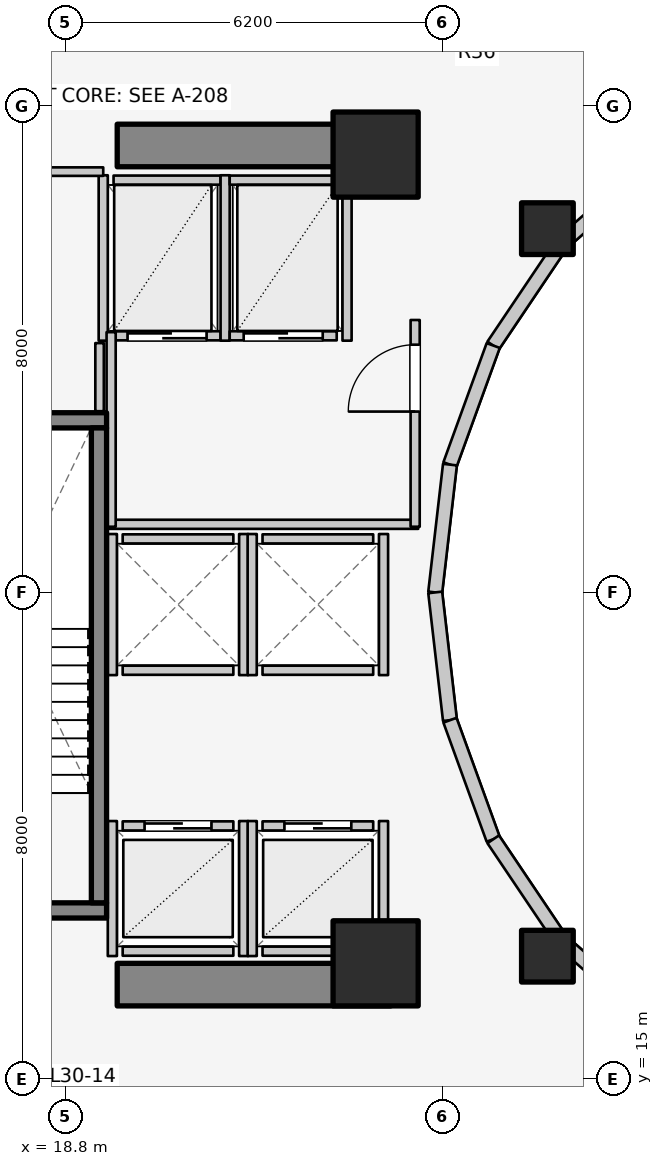
"""IFC4 building model, lengths in metres.
Left out: names, types, materials, properties, quantities, classifications, styles, units other than length and angle.
Written with IfcOpenShell. Run it as: python <this file> out.ifc"""

import sys

from ifc_helpers import new_model, si_unit, direction, frame, frame_2d, origin, origin_2d, place, context, subcontext, project, spatial, rectangle, extrude, element, fill, save


model = new_model("IFC4")
c1 = context("Model", 3, precision=1e-05, world=origin(), true_north=direction((0.0, 1.0)))
c2 = subcontext(c1, "Body", "Model", "MODEL_VIEW")
j1 = project(units=[si_unit("LENGTHUNIT", "METRE"), si_unit("PLANEANGLEUNIT", "RADIAN")], contexts=[c1])
p1 = place(None, origin())
s1 = spatial("IfcSite", under=j1, at=p1, CompositionType="ELEMENT")
p2 = place(p1, origin())
s2 = spatial("IfcBuilding", under=s1, at=p2, CompositionType="ELEMENT")
p3 = place(p2, frame((0.0, 0.0, 101.1)))
s3 = spatial("IfcBuildingStorey", under=s2, at=p3, CompositionType="ELEMENT", Elevation=101.1)
for number, where, z_axis, x_axis in (
    (1, (19.65, 16.55, 0.0), (0.0, 0.0, 1.0), (1.0, 0.0, 0.0)),
    (2, (19.65, 30.35, 0.0), (0.0, 0.0, 1.0), (1.0, 0.0, 0.0)),
):
    element("IfcWall", number, at=place(p3, frame(where, z_axis=z_axis, x_axis=x_axis)), inside=s3, PredefinedType="SHEAR", context=c2, shape_type="SweptSolid", body=[
        extrude(rectangle(XDim=4.5, YDim=0.7, at=frame_2d((2.25, 0.0))), origin(), (0.0, 0.0, 1.0), 3.1),
    ])
p4 = place(p3, frame((16.105, 17.77, 0.0), z_axis=(0.0, 0.0, 1.0), x_axis=(1.0, 0.0, 0.0)))
e3 = element("IfcWall", 3, at=p4, inside=s3, PredefinedType="SOLIDWALL", context=c2, shape_type="SweptSolid", body=[
    extrude(rectangle(XDim=3.37, YDim=0.25, at=frame_2d((1.685, 0.0))), origin(), (0.0, 0.0, 1.0), 3.1),
])
p5 = place(p4, frame((1.135, 0.0, 0.0)))
e4 = element("IfcOpeningElement", 4, at=p5, cuts=e3, PredefinedType="OPENING", context=c2, shape_type="SweptSolid", body=[
    extrude(rectangle(XDim=1.1, YDim=2.1, at=frame_2d((0.55, 1.05))), frame((0.0, 0.135, 0.0), z_axis=(0.0, -1.0, 0.0), x_axis=(1.0, 0.0, 0.0)), (0.0, 0.0, 1.0), 0.27),
])
p6 = place(p3, frame((16.105, 25.83, 0.0), z_axis=(0.0, 0.0, 1.0), x_axis=(1.0, 0.0, 0.0)))
e5 = element("IfcWall", 5, at=p6, inside=s3, PredefinedType="SOLIDWALL", context=c2, shape_type="SweptSolid", body=[
    extrude(rectangle(XDim=3.37, YDim=0.25, at=frame_2d((1.685, 0.0))), origin(), (0.0, 0.0, 1.0), 3.1),
])
p7 = place(p3, frame((19.35, 17.895, 0.0), z_axis=(0.0, 0.0, 1.0), x_axis=(0.0, 1.0, 0.0)))
e6 = element("IfcWall", 6, at=p7, inside=s3, PredefinedType="SOLIDWALL", context=c2, shape_type="SweptSolid", body=[
    extrude(rectangle(XDim=7.81, YDim=0.25, at=frame_2d((3.905, 0.0))), origin(), (0.0, 0.0, 1.0), 3.1),
])
for number, where, z_axis, x_axis in (
    (7, (23.9, 16.9, 0.0), (0.0, 0.0, 1.0), (1.0, 0.0, 0.0)),
    (8, (23.9, 30.2, 0.0), (0.0, 0.0, 1.0), (1.0, 0.0, 0.0)),
):
    element("IfcColumn", number, at=place(p3, frame(where, z_axis=z_axis, x_axis=x_axis)), inside=s3, PredefinedType="COLUMN", context=c2, shape_type="SweptSolid", body=[
        extrude(rectangle(XDim=1.4, YDim=1.4, at=origin_2d()), origin(), (0.0, 0.0, 1.0), 3.1),
    ])
for number, where, z_axis, x_axis in (
    (9, (26.725, 28.982, 0.0), (0.0, 0.0, 1.0), (1.0, 0.0, 0.0)),
    (10, (26.725, 17.018, 0.0), (0.0, 0.0, 1.0), (1.0, 0.0, 0.0)),
):
    element("IfcColumn", number, at=place(p3, frame(where, z_axis=z_axis, x_axis=x_axis)), inside=s3, PredefinedType="COLUMN", context=c2, shape_type="SweptSolid", body=[
        extrude(rectangle(XDim=0.85, YDim=0.85, at=origin_2d()), origin(), (0.0, 0.0, 1.0), 3.1),
    ])
p8 = place(p3, frame((28.44, 30.032, 0.0), z_axis=(0.0, 0.0, 1.0), x_axis=(-0.752576694707, -0.658504607869, 0.0)))
e11 = element("IfcWall", 11, at=p8, inside=s3, PredefinedType="STANDARD", context=c2, shape_type="SweptSolid", body=[
    extrude(rectangle(XDim=1.959, YDim=0.23, at=frame_2d((0.98, 0.0))), origin(), (0.0, 0.0, 1.0), 1.22),
])
p9 = place(p3, frame((26.965, 28.742, 0.0), z_axis=(0.0, 0.0, 1.0), x_axis=(-0.558197800898, -0.829707909492, 0.0)))
e12 = element("IfcWall", 12, at=p9, inside=s3, PredefinedType="STANDARD", context=c2, shape_type="SweptSolid", body=[
    extrude(rectangle(XDim=2.027, YDim=0.23, at=frame_2d((1.013, 0.0))), origin(), (0.0, 0.0, 1.0), 1.22),
])
p10 = place(p3, frame((25.834, 27.06, 0.0), z_axis=(0.0, 0.0, 1.0), x_axis=(-0.341423187295, -0.93990968033, 0.0)))
e13 = element("IfcWall", 13, at=p10, inside=s3, PredefinedType="STANDARD", context=c2, shape_type="SweptSolid", body=[
    extrude(rectangle(XDim=2.084, YDim=0.23, at=frame_2d((1.042, 0.0))), origin(), (0.0, 0.0, 1.0), 2.56),
])
for number, where, z_axis, x_axis in (
    (14, (25.123, 25.102, 0.0), (0.0, 0.0, 1.0), (-0.115, -0.993, 0.0)),
    (15, (24.88, 23.0, 0.0), (0.0, 0.0, 1.0), (0.115, -0.993, 0.0)),
):
    element("IfcWall", number, at=place(p3, frame(where, z_axis=z_axis, x_axis=x_axis)), inside=s3, PredefinedType="STANDARD", context=c2, shape_type="SweptSolid", body=[
        extrude(rectangle(XDim=2.115, YDim=0.23, at=frame_2d((1.058, 0.0))), origin(), (0.0, 0.0, 1.0), 2.56),
    ])
p11 = place(p3, frame((25.123, 20.898, 0.0), z_axis=(0.0, 0.0, 1.0), x_axis=(0.341423187295, -0.93990968033, 0.0)))
e16 = element("IfcWall", 16, at=p11, inside=s3, PredefinedType="STANDARD", context=c2, shape_type="SweptSolid", body=[
    extrude(rectangle(XDim=2.084, YDim=0.23, at=frame_2d((1.042, 0.0))), origin(), (0.0, 0.0, 1.0), 2.56),
])
p12 = place(p3, frame((25.834, 18.94, 0.0), z_axis=(0.0, 0.0, 1.0), x_axis=(0.558197800898, -0.829707909492, 0.0)))
e17 = element("IfcWall", 17, at=p12, inside=s3, PredefinedType="STANDARD", context=c2, shape_type="SweptSolid", body=[
    extrude(rectangle(XDim=2.027, YDim=0.23, at=frame_2d((1.013, 0.0))), origin(), (0.0, 0.0, 1.0), 1.22),
])
p13 = place(p3, frame((26.965, 17.258, 0.0), z_axis=(0.0, 0.0, 1.0), x_axis=(0.752576694707, -0.658504607869, 0.0)))
e18 = element("IfcWall", 18, at=p13, inside=s3, PredefinedType="STANDARD", context=c2, shape_type="SweptSolid", body=[
    extrude(rectangle(XDim=1.959, YDim=0.23, at=frame_2d((0.98, 0.0))), origin(), (0.0, 0.0, 1.0), 1.22),
])
p14 = place(p3, frame((19.74, 19.16, 0.0), z_axis=(0.0, 0.0, 1.0), x_axis=(1.0, 0.0, 0.0)))
e19 = element("IfcWall", 19, at=p14, inside=s3, PredefinedType="SOLIDWALL", context=c2, shape_type="SweptSolid", body=[
    extrude(rectangle(XDim=1.82, YDim=0.15, at=frame_2d((0.91, 0.0))), origin(), (0.0, 0.0, 1.0), 2.575),
])
p15 = place(p14, frame((0.36, 0.0, 0.0)))
e20 = element("IfcOpeningElement", 20, at=p15, cuts=e19, PredefinedType="OPENING", context=c2, shape_type="SweptSolid", body=[
    extrude(rectangle(XDim=1.1, YDim=2.1, at=frame_2d((0.55, 1.05))), frame((0.0, 0.085, 0.0), z_axis=(0.0, -1.0, 0.0), x_axis=(1.0, 0.0, 0.0)), (0.0, 0.0, 1.0), 0.17),
])
p16 = place(p3, frame((19.74, 17.1, 0.0), z_axis=(0.0, 0.0, 1.0), x_axis=(1.0, 0.0, 0.0)))
e21 = element("IfcWall", 21, at=p16, inside=s3, PredefinedType="SOLIDWALL", context=c2, shape_type="SweptSolid", body=[
    extrude(rectangle(XDim=1.82, YDim=0.15, at=frame_2d((0.91, 0.0))), origin(), (0.0, 0.0, 1.0), 2.575),
])
p17 = place(p3, frame((19.57, 17.02, 0.0), z_axis=(0.0, 0.0, 1.0), x_axis=(0.0, 1.0, 0.0)))
e22 = element("IfcWall", 22, at=p17, inside=s3, PredefinedType="SOLIDWALL", context=c2, shape_type="SweptSolid", body=[
    extrude(rectangle(XDim=2.22, YDim=0.15, at=frame_2d((1.11, 0.0))), origin(), (0.0, 0.0, 1.0), 2.12),
])
p18 = place(p3, frame((21.73, 17.02, 0.0), z_axis=(0.0, 0.0, 1.0), x_axis=(0.0, 1.0, 0.0)))
e23 = element("IfcWall", 23, at=p18, inside=s3, PredefinedType="SOLIDWALL", context=c2, shape_type="SweptSolid", body=[
    extrude(rectangle(XDim=2.22, YDim=0.15, at=frame_2d((1.11, 0.0))), origin(), (0.0, 0.0, 1.0), 2.575),
])
p19 = place(p3, frame((22.04, 19.16, 0.0), z_axis=(0.0, 0.0, 1.0), x_axis=(1.0, 0.0, 0.0)))
e24 = element("IfcWall", 24, at=p19, inside=s3, PredefinedType="SOLIDWALL", context=c2, shape_type="SweptSolid", body=[
    extrude(rectangle(XDim=1.82, YDim=0.15, at=frame_2d((0.91, 0.0))), origin(), (0.0, 0.0, 1.0), 2.12),
])
p20 = place(p19, frame((0.36, 0.0, 0.0)))
e25 = element("IfcOpeningElement", 25, at=p20, cuts=e24, PredefinedType="OPENING", context=c2, shape_type="SweptSolid", body=[
    extrude(rectangle(XDim=1.1, YDim=2.1, at=frame_2d((0.55, 1.05))), frame((0.0, 0.085, 0.0), z_axis=(0.0, -1.0, 0.0), x_axis=(1.0, 0.0, 0.0)), (0.0, 0.0, 1.0), 0.17),
])
p21 = place(p3, frame((22.04, 17.1, 0.0), z_axis=(0.0, 0.0, 1.0), x_axis=(1.0, 0.0, 0.0)))
e26 = element("IfcWall", 26, at=p21, inside=s3, PredefinedType="SOLIDWALL", context=c2, shape_type="SweptSolid", body=[
    extrude(rectangle(XDim=1.82, YDim=0.15, at=frame_2d((0.91, 0.0))), origin(), (0.0, 0.0, 1.0), 2.12),
])
p22 = place(p3, frame((21.87, 17.02, 0.0), z_axis=(0.0, 0.0, 1.0), x_axis=(0.0, 1.0, 0.0)))
e27 = element("IfcWall", 27, at=p22, inside=s3, PredefinedType="SOLIDWALL", context=c2, shape_type="SweptSolid", body=[
    extrude(rectangle(XDim=2.22, YDim=0.15, at=frame_2d((1.11, 0.0))), origin(), (0.0, 0.0, 1.0), 2.575),
])
p23 = place(p3, frame((24.03, 17.02, 0.0), z_axis=(0.0, 0.0, 1.0), x_axis=(0.0, 1.0, 0.0)))
e28 = element("IfcWall", 28, at=p23, inside=s3, PredefinedType="SOLIDWALL", context=c2, shape_type="SweptSolid", body=[
    extrude(rectangle(XDim=2.22, YDim=0.15, at=frame_2d((1.11, 0.0))), origin(), (0.0, 0.0, 1.0), 1.873),
])
for number, where, z_axis, x_axis in (
    (29, (19.74, 21.72, 0.0), (0.0, 0.0, 1.0), (1.0, 0.0, 0.0)),
    (30, (19.74, 23.88, 0.0), (0.0, 0.0, 1.0), (1.0, 0.0, 0.0)),
):
    element("IfcWall", number, at=place(p3, frame(where, z_axis=z_axis, x_axis=x_axis)), inside=s3, PredefinedType="SOLIDWALL", context=c2, shape_type="SweptSolid", body=[
        extrude(rectangle(XDim=1.82, YDim=0.15, at=frame_2d((0.91, 0.0))), origin(), (0.0, 0.0, 1.0), 2.575),
    ])
for number, where, z_axis, x_axis in (
    (31, (19.57, 21.64, 0.0), (0.0, 0.0, 1.0), (0.0, 1.0, 0.0)),
    (32, (21.73, 21.64, 0.0), (0.0, 0.0, 1.0), (0.0, 1.0, 0.0)),
):
    element("IfcWall", number, at=place(p3, frame(where, z_axis=z_axis, x_axis=x_axis)), inside=s3, PredefinedType="SOLIDWALL", context=c2, shape_type="SweptSolid", body=[
        extrude(rectangle(XDim=2.32, YDim=0.15, at=frame_2d((1.16, 0.0))), origin(), (0.0, 0.0, 1.0), 2.575),
    ])
for number, where, z_axis, x_axis in (
    (33, (22.04, 21.72, 0.0), (0.0, 0.0, 1.0), (1.0, 0.0, 0.0)),
    (34, (22.04, 23.88, 0.0), (0.0, 0.0, 1.0), (1.0, 0.0, 0.0)),
):
    element("IfcWall", number, at=place(p3, frame(where, z_axis=z_axis, x_axis=x_axis)), inside=s3, PredefinedType="SOLIDWALL", context=c2, shape_type="SweptSolid", body=[
        extrude(rectangle(XDim=1.82, YDim=0.15, at=frame_2d((0.91, 0.0))), origin(), (0.0, 0.0, 1.0), 2.12),
    ])
p24 = place(p3, frame((21.87, 21.64, 0.0), z_axis=(0.0, 0.0, 1.0), x_axis=(0.0, 1.0, 0.0)))
e35 = element("IfcWall", 35, at=p24, inside=s3, PredefinedType="SOLIDWALL", context=c2, shape_type="SweptSolid", body=[
    extrude(rectangle(XDim=2.32, YDim=0.15, at=frame_2d((1.16, 0.0))), origin(), (0.0, 0.0, 1.0), 2.575),
])
p25 = place(p3, frame((24.03, 21.64, 0.0), z_axis=(0.0, 0.0, 1.0), x_axis=(0.0, 1.0, 0.0)))
e36 = element("IfcWall", 36, at=p25, inside=s3, PredefinedType="SOLIDWALL", context=c2, shape_type="SweptSolid", body=[
    extrude(rectangle(XDim=2.32, YDim=0.15, at=frame_2d((1.16, 0.0))), origin(), (0.0, 0.0, 1.0), 2.12),
])
p26 = place(p3, frame((19.59, 27.22, 0.0), z_axis=(0.0, 0.0, 1.0), x_axis=(1.0, 0.0, 0.0)))
e37 = element("IfcWall", 37, at=p26, inside=s3, PredefinedType="SOLIDWALL", context=c2, shape_type="SweptSolid", body=[
    extrude(rectangle(XDim=1.76, YDim=0.15, at=frame_2d((0.88, 0.0))), origin(), (0.0, 0.0, 1.0), 2.575),
])
p27 = place(p26, frame((0.23, 0.0, 0.0)))
e38 = element("IfcOpeningElement", 38, at=p27, cuts=e37, PredefinedType="OPENING", context=c2, shape_type="SweptSolid", body=[
    extrude(rectangle(XDim=1.3, YDim=2.1, at=frame_2d((0.65, 1.05))), frame((0.0, 0.085, 0.0), z_axis=(0.0, -1.0, 0.0), x_axis=(1.0, 0.0, 0.0)), (0.0, 0.0, 1.0), 0.17),
])
p28 = place(p3, frame((19.59, 29.78, 0.0), z_axis=(0.0, 0.0, 1.0), x_axis=(1.0, 0.0, 0.0)))
e39 = element("IfcWall", 39, at=p28, inside=s3, PredefinedType="SOLIDWALL", context=c2, shape_type="SweptSolid", body=[
    extrude(rectangle(XDim=1.76, YDim=0.15, at=frame_2d((0.88, 0.0))), origin(), (0.0, 0.0, 1.0), 2.575),
])
for number, where, z_axis, x_axis in (
    (40, (19.42, 27.14, 0.0), (0.0, 0.0, 1.0), (0.0, 1.0, 0.0)),
    (41, (21.425, 27.14, 0.0), (0.0, 0.0, 1.0), (0.0, 1.0, 0.0)),
):
    element("IfcWall", number, at=place(p3, frame(where, z_axis=z_axis, x_axis=x_axis)), inside=s3, PredefinedType="SOLIDWALL", context=c2, shape_type="SweptSolid", body=[
        extrude(rectangle(XDim=2.72, YDim=0.15, at=frame_2d((1.36, 0.0))), origin(), (0.0, 0.0, 1.0), 2.575),
    ])
p29 = place(p3, frame((21.5, 27.22, 0.0), z_axis=(0.0, 0.0, 1.0), x_axis=(1.0, 0.0, 0.0)))
e42 = element("IfcWall", 42, at=p29, inside=s3, PredefinedType="SOLIDWALL", context=c2, shape_type="SweptSolid", body=[
    extrude(rectangle(XDim=1.76, YDim=0.15, at=frame_2d((0.88, 0.0))), origin(), (0.0, 0.0, 1.0), 2.575),
])
p30 = place(p29, frame((0.23, 0.0, 0.0)))
e43 = element("IfcOpeningElement", 43, at=p30, cuts=e42, PredefinedType="OPENING", context=c2, shape_type="SweptSolid", body=[
    extrude(rectangle(XDim=1.3, YDim=2.1, at=frame_2d((0.65, 1.05))), frame((0.0, 0.085, 0.0), z_axis=(0.0, -1.0, 0.0), x_axis=(1.0, 0.0, 0.0)), (0.0, 0.0, 1.0), 0.17),
])
p31 = place(p3, frame((21.5, 29.78, 0.0), z_axis=(0.0, 0.0, 1.0), x_axis=(1.0, 0.0, 0.0)))
e44 = element("IfcWall", 44, at=p31, inside=s3, PredefinedType="SOLIDWALL", context=c2, shape_type="SweptSolid", body=[
    extrude(rectangle(XDim=1.76, YDim=0.15, at=frame_2d((0.88, 0.0))), origin(), (0.0, 0.0, 1.0), 2.575),
])
p32 = place(p3, frame((23.43, 27.14, 0.0), z_axis=(0.0, 0.0, 1.0), x_axis=(0.0, 1.0, 0.0)))
e45 = element("IfcWall", 45, at=p32, inside=s3, PredefinedType="SOLIDWALL", context=c2, shape_type="SweptSolid", body=[
    extrude(rectangle(XDim=2.72, YDim=0.15, at=frame_2d((1.36, 0.0))), origin(), (0.0, 0.0, 1.0), 2.575),
])
p33 = place(p3, frame((19.52, 24.12, 0.0), z_axis=(0.0, 0.0, 1.0), x_axis=(1.0, 0.0, 0.0)))
e46 = element("IfcWall", 46, at=p33, inside=s3, PredefinedType="PARTITIONING", context=c2, shape_type="SweptSolid", body=[
    extrude(rectangle(XDim=5.08, YDim=0.15, at=frame_2d((2.54, 0.0))), origin(), (0.0, 0.0, 1.0), 2.12),
])
p34 = place(p3, frame((19.55, 24.08, 0.0), z_axis=(0.0, 0.0, 1.0), x_axis=(0.0, 1.0, 0.0)))
e47 = element("IfcWall", 47, at=p34, inside=s3, PredefinedType="PARTITIONING", context=c2, shape_type="SweptSolid", body=[
    extrude(rectangle(XDim=3.2, YDim=0.15, at=frame_2d((1.6, 0.0))), origin(), (0.0, 0.0, 1.0), 2.575),
])
p35 = place(p3, frame((24.55, 24.08, 0.0), z_axis=(0.0, 0.0, 1.0), x_axis=(0.0, 1.0, 0.0)))
e48 = element("IfcWall", 48, at=p35, inside=s3, PredefinedType="PARTITIONING", context=c2, shape_type="SweptSolid", body=[
    extrude(rectangle(XDim=3.4, YDim=0.15, at=frame_2d((1.7, 0.0))), origin(), (0.0, 0.0, 1.0), 2.575),
])
p36 = place(p35, frame((1.894, 0.0, 0.0)))
e49 = element("IfcOpeningElement", 49, at=p36, cuts=e48, PredefinedType="OPENING", context=c2, shape_type="SweptSolid", body=[
    extrude(rectangle(XDim=1.1, YDim=2.1, at=frame_2d((0.55, 1.05))), frame((0.0, 0.085, 0.0), z_axis=(0.0, -1.0, 0.0), x_axis=(1.0, 0.0, 0.0)), (0.0, 0.0, 1.0), 0.17),
])
p37 = place(p3, frame((16.12, 29.92, 0.0), z_axis=(0.0, 0.0, 1.0), x_axis=(1.0, 0.0, 0.0)))
e50 = element("IfcWall", 50, at=p37, inside=s3, PredefinedType="PLUMBINGWALL", context=c2, shape_type="SweptSolid", body=[
    extrude(rectangle(XDim=3.3, YDim=0.14, at=frame_2d((1.65, 0.0))), origin(), (0.0, 0.0, 1.0), 2.575),
])
p38 = place(p37, frame((1.516, 0.0, 0.0)))
e51 = element("IfcOpeningElement", 51, at=p38, cuts=e50, PredefinedType="OPENING", context=c2, shape_type="SweptSolid", body=[
    extrude(rectangle(XDim=0.85, YDim=2.05, at=frame_2d((0.425, 1.025))), frame((0.0, 0.08, 0.0), z_axis=(0.0, -1.0, 0.0), x_axis=(1.0, 0.0, 0.0)), (0.0, 0.0, 1.0), 0.16),
])
p39 = place(p3, frame((19.36, 25.98, 0.0), z_axis=(0.0, 0.0, 1.0), x_axis=(0.0, 1.0, 0.0)))
e52 = element("IfcWall", 52, at=p39, inside=s3, PredefinedType="PLUMBINGWALL", context=c2, shape_type="SweptSolid", body=[
    extrude(rectangle(XDim=1.12, YDim=0.14, at=frame_2d((0.56, 0.0))), origin(), (0.0, 0.0, 1.0), 2.575),
])
p40 = place(p15, origin())
e53 = element("IfcDoor", 53, at=p40, inside=s3, OperationType="DOUBLE_DOOR_SLIDING", PredefinedType="DOOR", context=c2, shape_type="SweptSolid", body=[
    extrude(rectangle(XDim=1.1, YDim=2.1, at=frame_2d((0.55, 1.05))), frame((0.0, 0.025, 0.0), z_axis=(0.0, -1.0, 0.0), x_axis=(1.0, 0.0, 0.0)), (0.0, 0.0, 1.0), 0.05),
])
fill(e20, e53)
p41 = place(p20, origin())
e54 = element("IfcDoor", 54, at=p41, inside=s3, OperationType="DOUBLE_DOOR_SLIDING", PredefinedType="DOOR", context=c2, shape_type="SweptSolid", body=[
    extrude(rectangle(XDim=1.1, YDim=2.1, at=frame_2d((0.55, 1.05))), frame((0.0, 0.025, 0.0), z_axis=(0.0, -1.0, 0.0), x_axis=(1.0, 0.0, 0.0)), (0.0, 0.0, 1.0), 0.05),
])
fill(e25, e54)
p42 = place(p27, origin())
e55 = element("IfcDoor", 55, at=p42, inside=s3, OperationType="DOUBLE_DOOR_SLIDING", PredefinedType="DOOR", context=c2, shape_type="SweptSolid", body=[
    extrude(rectangle(XDim=1.3, YDim=2.1, at=frame_2d((0.65, 1.05))), frame((0.0, 0.025, 0.0), z_axis=(0.0, -1.0, 0.0), x_axis=(1.0, 0.0, 0.0)), (0.0, 0.0, 1.0), 0.05),
])
fill(e38, e55)
p43 = place(p30, origin())
e56 = element("IfcDoor", 56, at=p43, inside=s3, OperationType="DOUBLE_DOOR_SLIDING", PredefinedType="DOOR", context=c2, shape_type="SweptSolid", body=[
    extrude(rectangle(XDim=1.3, YDim=2.1, at=frame_2d((0.65, 1.05))), frame((0.0, 0.025, 0.0), z_axis=(0.0, -1.0, 0.0), x_axis=(1.0, 0.0, 0.0)), (0.0, 0.0, 1.0), 0.05),
])
fill(e43, e56)
p44 = place(p36, origin())
e57 = element("IfcDoor", 57, at=p44, inside=s3, OperationType="SINGLE_SWING_LEFT", PredefinedType="DOOR", context=c2, shape_type="SweptSolid", body=[
    extrude(rectangle(XDim=1.1, YDim=2.1, at=frame_2d((0.55, 1.05))), frame((0.0, 0.025, 0.0), z_axis=(0.0, -1.0, 0.0), x_axis=(1.0, 0.0, 0.0)), (0.0, 0.0, 1.0), 0.05),
])
fill(e49, e57)
save(model, sys.argv[1])
